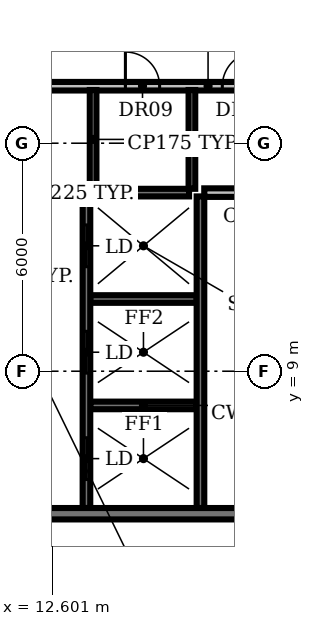
"""IFC4 building model, lengths in metres.
Left out: names, types, materials, properties, quantities, classifications, styles, units other than length and angle.
Written with IfcOpenShell. Run it as: python <this file> out.ifc"""

import sys

from ifc_helpers import new_model, si_unit, direction, frame, frame_2d, origin, place, context, subcontext, project, spatial, rectangle, extrude, element, fill, save


model = new_model("IFC4")
c1 = context("Model", 3, precision=1e-05, world=origin(), true_north=direction((0.0, 1.0)))
c2 = subcontext(c1, "Body", "Model", "MODEL_VIEW")
j1 = project(units=[si_unit("LENGTHUNIT", "METRE"), si_unit("PLANEANGLEUNIT", "RADIAN")], contexts=[c1])
p1 = place(None, origin())
s1 = spatial("IfcSite", under=j1, at=p1, CompositionType="ELEMENT")
p2 = place(p1, origin())
s2 = spatial("IfcBuilding", under=s1, at=p2, CompositionType="ELEMENT")
p3 = place(p2, frame((0.0, 0.0, 310.4)))
s3 = spatial("IfcBuildingStorey", under=s2, at=p3, CompositionType="ELEMENT", Elevation=310.4)
for number, where, z_axis, x_axis in (
    (1, (13.6, 8.1, 0.0), (0.0, 0.0, 1.0), (1.0, 0.0, 0.0)),
    (2, (13.6, 10.9, 0.0), (0.0, 0.0, 1.0), (1.0, 0.0, 0.0)),
):
    element("IfcWall", number, at=place(p3, frame(where, z_axis=z_axis, x_axis=x_axis)), inside=s3, PredefinedType="SHEAR", context=c2, shape_type="SweptSolid", body=[
        extrude(rectangle(XDim=2.8, YDim=0.2, at=frame_2d((1.4, 0.0))), origin(), (0.0, 0.0, 1.0), 3.9),
    ])
p4 = place(p3, frame((9.4, 13.7, 0.0), z_axis=(0.0, 0.0, 1.0), x_axis=(1.0, 0.0, 0.0)))
e3 = element("IfcWall", 3, at=p4, inside=s3, PredefinedType="PARTITIONING", context=c2, shape_type="SweptSolid", body=[
    extrude(rectangle(XDim=4.0, YDim=0.225, at=frame_2d((2.0, 0.0))), origin(), (0.0, 0.0, 1.0), 3.9),
])
p5 = place(p3, frame((13.75, 13.7, 0.0), z_axis=(0.0, 0.0, 1.0), x_axis=(1.0, 0.0, 0.0)))
e4 = element("IfcWall", 4, at=p5, inside=s3, PredefinedType="SHEAR", context=c2, shape_type="SweptSolid", body=[
    extrude(rectangle(XDim=2.45, YDim=0.2, at=frame_2d((1.225, 0.0))), origin(), (0.0, 0.0, 1.0), 3.9),
])
p6 = place(p3, frame((16.6, 13.7, 0.0), z_axis=(0.0, 0.0, 1.0), x_axis=(1.0, 0.0, 0.0)))
e5 = element("IfcWall", 5, at=p6, inside=s3, PredefinedType="PARTITIONING", context=c2, shape_type="SweptSolid", body=[
    extrude(rectangle(XDim=7.4, YDim=0.225, at=frame_2d((3.7, 0.0))), origin(), (0.0, 0.0, 1.0), 3.9),
])
p7 = place(p3, frame((9.4, 16.5, 0.0), z_axis=(0.0, 0.0, 1.0), x_axis=(1.0, 0.0, 0.0)))
e6 = element("IfcWall", 6, at=p7, inside=s3, PredefinedType="PARTITIONING", context=c2, shape_type="SweptSolid", body=[
    extrude(rectangle(XDim=14.6, YDim=0.225, at=frame_2d((7.3, 0.0))), origin(), (0.0, 0.0, 1.0), 3.9),
])
p8 = place(p7, frame((1.6, 0.0, 0.0)))
e7 = element("IfcOpeningElement", 7, at=p8, cuts=e6, PredefinedType="OPENING", context=c2, shape_type="SweptSolid", body=[
    extrude(rectangle(XDim=1.0, YDim=2.1, at=frame_2d((0.5, 1.05))), frame((0.0, 0.123, 0.0), z_axis=(0.0, -1.0, 0.0), x_axis=(1.0, 0.0, 0.0)), (0.0, 0.0, 1.0), 0.245),
])
p9 = place(p7, frame((5.125, 0.0, 0.0)))
e8 = element("IfcOpeningElement", 8, at=p9, cuts=e6, PredefinedType="OPENING", context=c2, shape_type="SweptSolid", body=[
    extrude(rectangle(XDim=0.9, YDim=2.1, at=frame_2d((0.45, 1.05))), frame((0.0, 0.123, 0.0), z_axis=(0.0, -1.0, 0.0), x_axis=(1.0, 0.0, 0.0)), (0.0, 0.0, 1.0), 0.245),
])
p10 = place(p7, frame((7.675, 0.0, 0.0)))
e9 = element("IfcOpeningElement", 9, at=p10, cuts=e6, PredefinedType="OPENING", context=c2, shape_type="SweptSolid", body=[
    extrude(rectangle(XDim=0.9, YDim=2.1, at=frame_2d((0.45, 1.05))), frame((0.0, 0.123, 0.0), z_axis=(0.0, -1.0, 0.0), x_axis=(1.0, 0.0, 0.0)), (0.0, 0.0, 1.0), 0.245),
])
p11 = place(p7, frame((9.775, 0.0, 0.0)))
e10 = element("IfcOpeningElement", 10, at=p11, cuts=e6, PredefinedType="OPENING", context=c2, shape_type="SweptSolid", body=[
    extrude(rectangle(XDim=0.9, YDim=2.1, at=frame_2d((0.45, 1.05))), frame((0.0, 0.123, 0.0), z_axis=(0.0, -1.0, 0.0), x_axis=(1.0, 0.0, 0.0)), (0.0, 0.0, 1.0), 0.245),
])
p12 = place(p7, frame((12.4, 0.0, 0.0)))
e11 = element("IfcOpeningElement", 11, at=p12, cuts=e6, PredefinedType="OPENING", context=c2, shape_type="SweptSolid", body=[
    extrude(rectangle(XDim=1.0, YDim=2.1, at=frame_2d((0.5, 1.05))), frame((0.0, 0.123, 0.0), z_axis=(0.0, -1.0, 0.0), x_axis=(1.0, 0.0, 0.0)), (0.0, 0.0, 1.0), 0.245),
])
p13 = place(p3, frame((13.5, 5.4, 0.0), z_axis=(0.0, 0.0, 1.0), x_axis=(0.0, 1.0, 0.0)))
e12 = element("IfcWall", 12, at=p13, inside=s3, PredefinedType="SHEAR", context=c2, shape_type="SweptSolid", body=[
    extrude(rectangle(XDim=8.2, YDim=0.2, at=frame_2d((4.1, 0.0))), origin(), (0.0, 0.0, 1.0), 3.9),
])
p14 = place(p13, frame((0.75, 0.0, 0.0)))
e13 = element("IfcOpeningElement", 13, at=p14, cuts=e12, PredefinedType="OPENING", context=c2, shape_type="SweptSolid", body=[
    extrude(rectangle(XDim=1.1, YDim=2.1, at=frame_2d((0.55, 1.05))), frame((0.0, 0.11, 0.0), z_axis=(0.0, -1.0, 0.0), x_axis=(1.0, 0.0, 0.0)), (0.0, 0.0, 1.0), 0.22),
])
p15 = place(p13, frame((3.55, 0.0, 0.0)))
e14 = element("IfcOpeningElement", 14, at=p15, cuts=e12, PredefinedType="OPENING", context=c2, shape_type="SweptSolid", body=[
    extrude(rectangle(XDim=1.1, YDim=2.1, at=frame_2d((0.55, 1.05))), frame((0.0, 0.11, 0.0), z_axis=(0.0, -1.0, 0.0), x_axis=(1.0, 0.0, 0.0)), (0.0, 0.0, 1.0), 0.22),
])
p16 = place(p13, frame((6.35, 0.0, 0.0)))
e15 = element("IfcOpeningElement", 15, at=p16, cuts=e12, PredefinedType="OPENING", context=c2, shape_type="SweptSolid", body=[
    extrude(rectangle(XDim=1.1, YDim=2.1, at=frame_2d((0.55, 1.05))), frame((0.0, 0.11, 0.0), z_axis=(0.0, -1.0, 0.0), x_axis=(1.0, 0.0, 0.0)), (0.0, 0.0, 1.0), 0.22),
])
for number, where, z_axis, x_axis in (
    (16, (13.675, 13.8, 0.0), (0.0, 0.0, 1.0), (0.0, 1.0, 0.0)),
    (17, (16.275, 13.8, 0.0), (0.0, 0.0, 1.0), (0.0, 1.0, 0.0)),
):
    element("IfcWall", number, at=place(p3, frame(where, z_axis=z_axis, x_axis=x_axis)), inside=s3, PredefinedType="PARTITIONING", context=c2, shape_type="SweptSolid", body=[
        extrude(rectangle(XDim=2.6, YDim=0.175, at=frame_2d((1.3, 0.0))), origin(), (0.0, 0.0, 1.0), 3.9),
    ])
p17 = place(p3, frame((16.5, 5.4, 0.0), z_axis=(0.0, 0.0, 1.0), x_axis=(0.0, 1.0, 0.0)))
e18 = element("IfcWall", 18, at=p17, inside=s3, PredefinedType="SHEAR", context=c2, shape_type="SweptSolid", body=[
    extrude(rectangle(XDim=8.2, YDim=0.2, at=frame_2d((4.1, 0.0))), origin(), (0.0, 0.0, 1.0), 3.9),
])
p18 = place(p3, frame((24.0, 5.25, 0.0), z_axis=(0.0, 0.0, 1.0), x_axis=(-1.0, 0.0, 0.0)))
e19 = element("IfcWall", 19, at=p18, inside=s3, PredefinedType="SHEAR", context=c2, shape_type="SweptSolid", body=[
    extrude(rectangle(XDim=18.0, YDim=0.3, at=frame_2d((9.0, 0.0))), origin(), (0.0, 0.0, 1.0), 3.9),
])
p19 = place(p18, frame((13.0, 0.0, 0.0)))
e20 = element("IfcOpeningElement", 20, at=p19, cuts=e19, PredefinedType="OPENING", context=c2, shape_type="SweptSolid", body=[
    extrude(rectangle(XDim=1.2, YDim=2.1, at=frame_2d((0.6, 1.05))), frame((0.0, 0.16, 0.0), z_axis=(0.0, -1.0, 0.0), x_axis=(1.0, 0.0, 0.0)), (0.0, 0.0, 1.0), 0.32),
])
p20 = place(p18, frame((4.9, 0.0, 0.0)))
e21 = element("IfcOpeningElement", 21, at=p20, cuts=e19, PredefinedType="OPENING", context=c2, shape_type="SweptSolid", body=[
    extrude(rectangle(XDim=1.0, YDim=2.1, at=frame_2d((0.5, 1.05))), frame((0.0, 0.16, 0.0), z_axis=(0.0, -1.0, 0.0), x_axis=(1.0, 0.0, 0.0)), (0.0, 0.0, 1.0), 0.32),
])
p21 = place(p9, origin())
e22 = element("IfcDoor", 22, at=p21, inside=s3, OperationType="SINGLE_SWING_LEFT", PredefinedType="DOOR", context=c2, shape_type="SweptSolid", body=[
    extrude(rectangle(XDim=0.9, YDim=2.1, at=frame_2d((0.45, 1.05))), frame((0.0, 0.025, 0.0), z_axis=(0.0, -1.0, 0.0), x_axis=(1.0, 0.0, 0.0)), (0.0, 0.0, 1.0), 0.05),
])
fill(e8, e22)
p22 = place(p10, origin())
e23 = element("IfcDoor", 23, at=p22, inside=s3, OperationType="SINGLE_SWING_RIGHT", PredefinedType="DOOR", context=c2, shape_type="SweptSolid", body=[
    extrude(rectangle(XDim=0.9, YDim=2.1, at=frame_2d((0.45, 1.05))), frame((0.0, 0.025, 0.0), z_axis=(0.0, -1.0, 0.0), x_axis=(1.0, 0.0, 0.0)), (0.0, 0.0, 1.0), 0.05),
])
fill(e9, e23)
p23 = place(p14, origin())
e24 = element("IfcDoor", 24, at=p23, inside=s3, OperationType="DOUBLE_DOOR_SLIDING", PredefinedType="DOOR", context=c2, shape_type="SweptSolid", body=[
    extrude(rectangle(XDim=1.1, YDim=2.1, at=frame_2d((0.55, 1.05))), frame((0.0, 0.025, 0.0), z_axis=(0.0, -1.0, 0.0), x_axis=(1.0, 0.0, 0.0)), (0.0, 0.0, 1.0), 0.05),
])
fill(e13, e24)
p24 = place(p15, origin())
e25 = element("IfcDoor", 25, at=p24, inside=s3, OperationType="DOUBLE_DOOR_SLIDING", PredefinedType="DOOR", context=c2, shape_type="SweptSolid", body=[
    extrude(rectangle(XDim=1.1, YDim=2.1, at=frame_2d((0.55, 1.05))), frame((0.0, 0.025, 0.0), z_axis=(0.0, -1.0, 0.0), x_axis=(1.0, 0.0, 0.0)), (0.0, 0.0, 1.0), 0.05),
])
fill(e14, e25)
p25 = place(p16, origin())
e26 = element("IfcDoor", 26, at=p25, inside=s3, OperationType="DOUBLE_DOOR_SLIDING", PredefinedType="DOOR", context=c2, shape_type="SweptSolid", body=[
    extrude(rectangle(XDim=1.1, YDim=2.1, at=frame_2d((0.55, 1.05))), frame((0.0, 0.025, 0.0), z_axis=(0.0, -1.0, 0.0), x_axis=(1.0, 0.0, 0.0)), (0.0, 0.0, 1.0), 0.05),
])
fill(e15, e26)
save(model, sys.argv[1])
